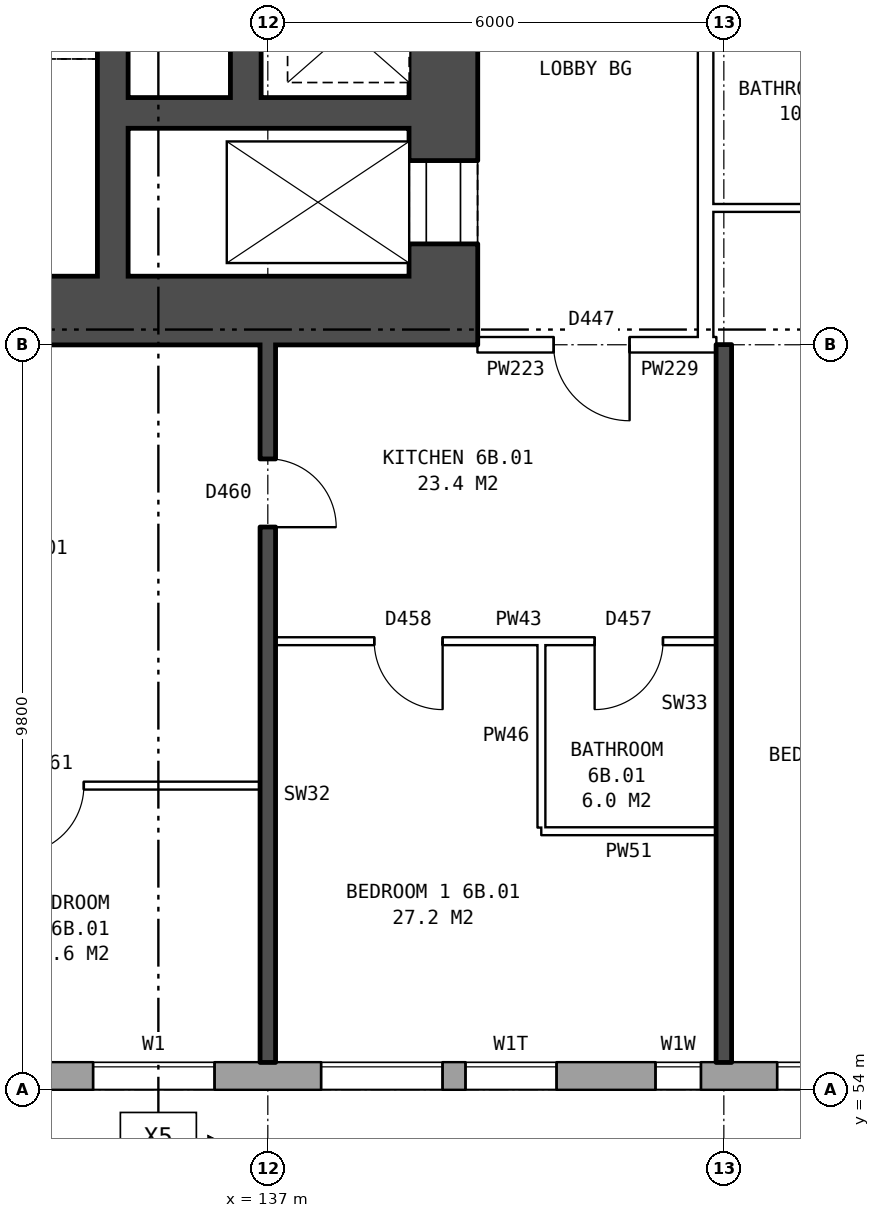
"""IFC4 building model, lengths in metres.
Left out: names, types, materials, properties, quantities, classifications, styles, units other than length and angle.
Written with IfcOpenShell. Run it as: python <this file> out.ifc"""

import sys

from ifc_helpers import new_model, si_unit, direction, frame, frame_2d, origin, place, context, subcontext, project, spatial, rectangle, extrude, element, fill, save


model = new_model("IFC4")
c1 = context("Model", 3, precision=1e-05, world=origin(), true_north=direction((0.0, 1.0)))
c2 = subcontext(c1, "Body", "Model", "MODEL_VIEW")
j1 = project(units=[si_unit("LENGTHUNIT", "METRE"), si_unit("PLANEANGLEUNIT", "RADIAN")], contexts=[c1])
p1 = place(None, origin())
s1 = spatial("IfcSite", under=j1, at=p1, CompositionType="ELEMENT")
p2 = place(p1, origin())
s2 = spatial("IfcBuilding", under=s1, at=p2, CompositionType="ELEMENT")
p3 = place(p2, frame((0.0, 0.0, 25.7)))
s3 = spatial("IfcBuildingStorey", under=s2, at=p3, CompositionType="ELEMENT", Elevation=25.7)
p4 = place(p3, frame((131.18, 57.075, 0.0), z_axis=(0.0, 0.0, 1.0), x_axis=(0.707106781187, -0.707106781187, 0.0)))
e1 = element("IfcWall", 1, at=p4, inside=s3, PredefinedType="STANDARD", context=c2, shape_type="SweptSolid", body=[
    extrude(rectangle(XDim=4.094, YDim=0.36, at=frame_2d((2.047, 0.0))), origin(), (0.0, 0.0, 1.0), 2.85),
])
p5 = place(p4, frame((1.247, 0.0, 0.8)))
e2 = element("IfcOpeningElement", 2, at=p5, cuts=e1, PredefinedType="OPENING", context=c2, shape_type="SweptSolid", body=[
    extrude(rectangle(XDim=1.6, YDim=1.8, at=frame_2d((0.8, 0.9))), frame((0.0, 0.19, 0.0), z_axis=(0.0, -1.0, 0.0), x_axis=(1.0, 0.0, 0.0)), (0.0, 0.0, 1.0), 0.38),
])
p6 = place(p3, frame((134.075, 54.18, 0.0), z_axis=(0.0, 0.0, 1.0), x_axis=(1.0, 0.0, 0.0)))
e3 = element("IfcWall", 3, at=p6, inside=s3, PredefinedType="STANDARD", context=c2, shape_type="SweptSolid", body=[
    extrude(rectangle(XDim=40.601, YDim=0.36, at=frame_2d((20.3, 0.0))), origin(), (0.0, 0.0, 1.0), 2.85),
])
p7 = place(p6, frame((0.625, 0.0, 0.8)))
e4 = element("IfcOpeningElement", 4, at=p7, cuts=e3, PredefinedType="OPENING", context=c2, shape_type="SweptSolid", body=[
    extrude(rectangle(XDim=1.6, YDim=1.8, at=frame_2d((0.8, 0.9))), frame((0.0, 0.19, 0.0), z_axis=(0.0, -1.0, 0.0), x_axis=(1.0, 0.0, 0.0)), (0.0, 0.0, 1.0), 0.38),
])
p8 = place(p6, frame((3.625, 0.0, 0.8)))
e5 = element("IfcOpeningElement", 5, at=p8, cuts=e3, PredefinedType="OPENING", context=c2, shape_type="SweptSolid", body=[
    extrude(rectangle(XDim=1.6, YDim=1.8, at=frame_2d((0.8, 0.9))), frame((0.0, 0.19, 0.0), z_axis=(0.0, -1.0, 0.0), x_axis=(1.0, 0.0, 0.0)), (0.0, 0.0, 1.0), 0.38),
])
p9 = place(p6, frame((5.525, 0.0, 1.7)))
e6 = element("IfcOpeningElement", 6, at=p9, cuts=e3, PredefinedType="OPENING", context=c2, shape_type="SweptSolid", body=[
    extrude(rectangle(XDim=1.2, YDim=0.9, at=frame_2d((0.6, 0.45))), frame((0.0, 0.19, 0.0), z_axis=(0.0, -1.0, 0.0), x_axis=(1.0, 0.0, 0.0)), (0.0, 0.0, 1.0), 0.38),
])
p10 = place(p6, frame((9.625, 0.0, 0.8)))
e7 = element("IfcOpeningElement", 7, at=p10, cuts=e3, PredefinedType="OPENING", context=c2, shape_type="SweptSolid", body=[
    extrude(rectangle(XDim=1.6, YDim=1.8, at=frame_2d((0.8, 0.9))), frame((0.0, 0.19, 0.0), z_axis=(0.0, -1.0, 0.0), x_axis=(1.0, 0.0, 0.0)), (0.0, 0.0, 1.0), 0.38),
])
p11 = place(p6, frame((12.625, 0.0, 0.8)))
e8 = element("IfcOpeningElement", 8, at=p11, cuts=e3, PredefinedType="OPENING", context=c2, shape_type="SweptSolid", body=[
    extrude(rectangle(XDim=1.6, YDim=1.8, at=frame_2d((0.8, 0.9))), frame((0.0, 0.19, 0.0), z_axis=(0.0, -1.0, 0.0), x_axis=(1.0, 0.0, 0.0)), (0.0, 0.0, 1.0), 0.38),
])
p12 = place(p6, frame((15.625, 0.0, 0.8)))
e9 = element("IfcOpeningElement", 9, at=p12, cuts=e3, PredefinedType="OPENING", context=c2, shape_type="SweptSolid", body=[
    extrude(rectangle(XDim=1.6, YDim=1.8, at=frame_2d((0.8, 0.9))), frame((0.0, 0.19, 0.0), z_axis=(0.0, -1.0, 0.0), x_axis=(1.0, 0.0, 0.0)), (0.0, 0.0, 1.0), 0.38),
])
p13 = place(p6, frame((18.625, 0.0, 0.8)))
e10 = element("IfcOpeningElement", 10, at=p13, cuts=e3, PredefinedType="OPENING", context=c2, shape_type="SweptSolid", body=[
    extrude(rectangle(XDim=1.6, YDim=1.8, at=frame_2d((0.8, 0.9))), frame((0.0, 0.19, 0.0), z_axis=(0.0, -1.0, 0.0), x_axis=(1.0, 0.0, 0.0)), (0.0, 0.0, 1.0), 0.38),
])
p14 = place(p6, frame((21.625, 0.0, 0.8)))
e11 = element("IfcOpeningElement", 11, at=p14, cuts=e3, PredefinedType="OPENING", context=c2, shape_type="SweptSolid", body=[
    extrude(rectangle(XDim=1.6, YDim=1.8, at=frame_2d((0.8, 0.9))), frame((0.0, 0.19, 0.0), z_axis=(0.0, -1.0, 0.0), x_axis=(1.0, 0.0, 0.0)), (0.0, 0.0, 1.0), 0.38),
])
p15 = place(p6, frame((24.625, 0.0, 0.8)))
e12 = element("IfcOpeningElement", 12, at=p15, cuts=e3, PredefinedType="OPENING", context=c2, shape_type="SweptSolid", body=[
    extrude(rectangle(XDim=1.6, YDim=1.8, at=frame_2d((0.8, 0.9))), frame((0.0, 0.19, 0.0), z_axis=(0.0, -1.0, 0.0), x_axis=(1.0, 0.0, 0.0)), (0.0, 0.0, 1.0), 0.38),
])
p16 = place(p6, frame((27.625, 0.0, 0.8)))
e13 = element("IfcOpeningElement", 13, at=p16, cuts=e3, PredefinedType="OPENING", context=c2, shape_type="SweptSolid", body=[
    extrude(rectangle(XDim=1.6, YDim=1.8, at=frame_2d((0.8, 0.9))), frame((0.0, 0.19, 0.0), z_axis=(0.0, -1.0, 0.0), x_axis=(1.0, 0.0, 0.0)), (0.0, 0.0, 1.0), 0.38),
])
p17 = place(p6, frame((30.125, 0.0, 0.8)))
e14 = element("IfcOpeningElement", 14, at=p17, cuts=e3, PredefinedType="OPENING", context=c2, shape_type="SweptSolid", body=[
    extrude(rectangle(XDim=1.2, YDim=1.8, at=frame_2d((0.6, 0.9))), frame((0.0, 0.19, 0.0), z_axis=(0.0, -1.0, 0.0), x_axis=(1.0, 0.0, 0.0)), (0.0, 0.0, 1.0), 0.38),
])
p18 = place(p6, frame((33.825, 0.0, 1.7)))
e15 = element("IfcOpeningElement", 15, at=p18, cuts=e3, PredefinedType="OPENING", context=c2, shape_type="SweptSolid", body=[
    extrude(rectangle(XDim=1.0, YDim=0.9, at=frame_2d((0.5, 0.45))), frame((0.0, 0.19, 0.0), z_axis=(0.0, -1.0, 0.0), x_axis=(1.0, 0.0, 0.0)), (0.0, 0.0, 1.0), 0.38),
])
p19 = place(p6, frame((36.625, 0.0, 0.8)))
e16 = element("IfcOpeningElement", 16, at=p19, cuts=e3, PredefinedType="OPENING", context=c2, shape_type="SweptSolid", body=[
    extrude(rectangle(XDim=1.6, YDim=1.8, at=frame_2d((0.8, 0.9))), frame((0.0, 0.19, 0.0), z_axis=(0.0, -1.0, 0.0), x_axis=(1.0, 0.0, 0.0)), (0.0, 0.0, 1.0), 0.38),
])
p20 = place(p6, frame((8.025, 0.0, 0.8)))
e17 = element("IfcOpeningElement", 17, at=p20, cuts=e3, PredefinedType="OPENING", context=c2, shape_type="SweptSolid", body=[
    extrude(rectangle(XDim=0.6, YDim=0.9, at=frame_2d((0.3, 0.45))), frame((0.0, 0.19, 0.0), z_axis=(0.0, -1.0, 0.0), x_axis=(1.0, 0.0, 0.0)), (0.0, 0.0, 1.0), 0.38),
])
p21 = place(p6, frame((31.625, 0.0, 0.8)))
e18 = element("IfcOpeningElement", 18, at=p21, cuts=e3, PredefinedType="OPENING", context=c2, shape_type="SweptSolid", body=[
    extrude(rectangle(XDim=0.6, YDim=1.2, at=frame_2d((0.3, 0.6))), frame((0.0, 0.19, 0.0), z_axis=(0.0, -1.0, 0.0), x_axis=(1.0, 0.0, 0.0)), (0.0, 0.0, 1.0), 0.38),
])
p22 = place(p6, frame((35.125, 0.0, 0.8)))
e19 = element("IfcOpeningElement", 19, at=p22, cuts=e3, PredefinedType="OPENING", context=c2, shape_type="SweptSolid", body=[
    extrude(rectangle(XDim=1.2, YDim=1.8, at=frame_2d((0.6, 0.9))), frame((0.0, 0.19, 0.0), z_axis=(0.0, -1.0, 0.0), x_axis=(1.0, 0.0, 0.0)), (0.0, 0.0, 1.0), 0.38),
])
p23 = place(p3, frame((139.31, 64.7, 0.0), z_axis=(0.0, 0.0, 1.0), x_axis=(0.0, 1.0, 0.0)))
e20 = element("IfcWall", 20, at=p23, inside=s3, PredefinedType="SHEAR", context=c2, shape_type="SweptSolid", body=[
    extrude(rectangle(XDim=10.6, YDim=0.9, at=frame_2d((5.3, 0.0))), origin(), (0.0, 0.0, 1.0), 2.85),
])
p24 = place(p23, frame((0.425, 0.0, 0.0)))
e21 = element("IfcOpeningElement", 21, at=p24, cuts=e20, PredefinedType="OPENING", context=c2, shape_type="SweptSolid", body=[
    extrude(rectangle(XDim=1.1, YDim=2.1, at=frame_2d((0.55, 1.05))), frame((0.0, 0.46, 0.0), z_axis=(0.0, -1.0, 0.0), x_axis=(1.0, 0.0, 0.0)), (0.0, 0.0, 1.0), 0.92),
])
p25 = place(p23, frame((9.0, 0.0, 0.0)))
e22 = element("IfcOpeningElement", 22, at=p25, cuts=e20, PredefinedType="OPENING", context=c2, shape_type="SweptSolid", body=[
    extrude(rectangle(XDim=1.1, YDim=2.1, at=frame_2d((0.55, 1.05))), frame((0.0, 0.46, 0.0), z_axis=(0.0, -1.0, 0.0), x_axis=(1.0, 0.0, 0.0)), (0.0, 0.0, 1.0), 0.92),
])
p26 = place(p23, frame((7.225, 0.0, 0.0)))
e23 = element("IfcOpeningElement", 23, at=p26, cuts=e20, PredefinedType="OPENING", context=c2, shape_type="SweptSolid", body=[
    extrude(rectangle(XDim=0.85, YDim=2.1, at=frame_2d((0.425, 1.05))), frame((0.0, 0.46, 0.0), z_axis=(0.0, -1.0, 0.0), x_axis=(1.0, 0.0, 0.0)), (0.0, 0.0, 1.0), 0.92),
])
p27 = place(p3, frame((139.76, 64.25, 0.0), z_axis=(0.0, 0.0, 1.0), x_axis=(-1.0, 0.0, 0.0)))
e24 = element("IfcWall", 24, at=p27, inside=s3, PredefinedType="SHEAR", context=c2, shape_type="SweptSolid", body=[
    extrude(rectangle(XDim=8.4, YDim=0.9, at=frame_2d((4.2, 0.0))), origin(), (0.0, 0.0, 1.0), 2.85),
])
p28 = place(p3, frame((138.86, 66.85, 0.0), z_axis=(0.0, 0.0, 1.0), x_axis=(-1.0, 0.0, 0.0)))
e25 = element("IfcWall", 25, at=p28, inside=s3, PredefinedType="SHEAR", context=c2, shape_type="SweptSolid", body=[
    extrude(rectangle(XDim=3.7, YDim=0.4, at=frame_2d((1.85, 0.0))), origin(), (0.0, 0.0, 1.0), 2.85),
])
p29 = place(p3, frame((136.71, 67.05, 0.0), z_axis=(0.0, 0.0, 1.0), x_axis=(0.0, 1.0, 0.0)))
e26 = element("IfcWall", 26, at=p29, inside=s3, PredefinedType="SHEAR", context=c2, shape_type="SweptSolid", body=[
    extrude(rectangle(XDim=4.0, YDim=0.4, at=frame_2d((2.0, 0.0))), origin(), (0.0, 0.0, 1.0), 2.85),
])
p30 = place(p3, frame((134.96, 64.7, 0.0), z_axis=(0.0, 0.0, 1.0), x_axis=(0.0, 1.0, 0.0)))
e27 = element("IfcWall", 27, at=p30, inside=s3, PredefinedType="SHEAR", context=c2, shape_type="SweptSolid", body=[
    extrude(rectangle(XDim=6.35, YDim=0.4, at=frame_2d((3.175, 0.0))), origin(), (0.0, 0.0, 1.0), 2.85),
])
p31 = place(p3, frame((142.76, 63.9, 0.0), z_axis=(0.0, 0.0, 1.0), x_axis=(0.0, 1.0, 0.0)))
e28 = element("IfcWall", 28, at=p31, inside=s3, PredefinedType="PARTITIONING", context=c2, shape_type="SweptSolid", body=[
    extrude(rectangle(XDim=12.2, YDim=0.2, at=frame_2d((6.1, 0.0))), origin(), (0.0, 0.0, 1.0), 2.85),
])
p32 = place(p31, frame((5.1, 0.0, 0.0)))
e29 = element("IfcOpeningElement", 29, at=p32, cuts=e28, PredefinedType="OPENING", context=c2, shape_type="SweptSolid", body=[
    extrude(rectangle(XDim=2.0, YDim=2.1, at=frame_2d((1.0, 1.05))), frame((0.0, 0.11, 0.0), z_axis=(0.0, -1.0, 0.0), x_axis=(1.0, 0.0, 0.0)), (0.0, 0.0, 1.0), 0.22),
])
p33 = place(p3, frame((140.6, 57.4, 0.0), z_axis=(0.0, 0.0, 1.0), x_axis=(1.0, 0.0, 0.0)))
e30 = element("IfcWall", 30, at=p33, inside=s3, PredefinedType="PARTITIONING", context=c2, shape_type="SweptSolid", body=[
    extrude(rectangle(XDim=2.3, YDim=0.1, at=frame_2d((1.15, 0.0))), origin(), (0.0, 0.0, 1.0), 2.85),
])
p34 = place(p3, frame((131.36, 58.0, 0.0), z_axis=(0.0, 0.0, 1.0), x_axis=(1.0, 0.0, 0.0)))
e31 = element("IfcWall", 31, at=p34, inside=s3, PredefinedType="PARTITIONING", context=c2, shape_type="SweptSolid", body=[
    extrude(rectangle(XDim=5.54, YDim=0.1, at=frame_2d((2.77, 0.0))), origin(), (0.0, 0.0, 1.0), 2.85),
])
p35 = place(p34, frame((2.32, 0.0, 0.0)))
e32 = element("IfcOpeningElement", 32, at=p35, cuts=e31, PredefinedType="OPENING", context=c2, shape_type="SweptSolid", body=[
    extrude(rectangle(XDim=0.9, YDim=2.1, at=frame_2d((0.45, 1.05))), frame((0.0, 0.06, 0.0), z_axis=(0.0, -1.0, 0.0), x_axis=(1.0, 0.0, 0.0)), (0.0, 0.0, 1.0), 0.12),
])
p36 = place(p3, frame((137.1, 59.9, 0.0), z_axis=(0.0, 0.0, 1.0), x_axis=(1.0, 0.0, 0.0)))
e33 = element("IfcWall", 33, at=p36, inside=s3, PredefinedType="PARTITIONING", context=c2, shape_type="SweptSolid", body=[
    extrude(rectangle(XDim=5.8, YDim=0.1, at=frame_2d((2.9, 0.0))), origin(), (0.0, 0.0, 1.0), 2.85),
])
p37 = place(p36, frame((1.3, 0.0, 0.0)))
e34 = element("IfcOpeningElement", 34, at=p37, cuts=e33, PredefinedType="OPENING", context=c2, shape_type="SweptSolid", body=[
    extrude(rectangle(XDim=0.9, YDim=2.1, at=frame_2d((0.45, 1.05))), frame((0.0, 0.06, 0.0), z_axis=(0.0, -1.0, 0.0), x_axis=(1.0, 0.0, 0.0)), (0.0, 0.0, 1.0), 0.12),
])
p38 = place(p36, frame((4.2, 0.0, 0.0)))
e35 = element("IfcOpeningElement", 35, at=p38, cuts=e33, PredefinedType="OPENING", context=c2, shape_type="SweptSolid", body=[
    extrude(rectangle(XDim=0.9, YDim=2.1, at=frame_2d((0.45, 1.05))), frame((0.0, 0.06, 0.0), z_axis=(0.0, -1.0, 0.0), x_axis=(1.0, 0.0, 0.0)), (0.0, 0.0, 1.0), 0.12),
])
p39 = place(p3, frame((139.76, 63.8, 0.0), z_axis=(0.0, 0.0, 1.0), x_axis=(1.0, 0.0, 0.0)))
e36 = element("IfcWall", 36, at=p39, inside=s3, PredefinedType="PARTITIONING", context=c2, shape_type="SweptSolid", body=[
    extrude(rectangle(XDim=3.0, YDim=0.2, at=frame_2d((1.5, 0.0))), origin(), (0.0, 0.0, 1.0), 2.85),
])
p40 = place(p39, frame((1.0, 0.0, 0.0)))
e37 = element("IfcOpeningElement", 37, at=p40, cuts=e36, PredefinedType="OPENING", context=c2, shape_type="SweptSolid", body=[
    extrude(rectangle(XDim=1.0, YDim=2.1, at=frame_2d((0.5, 1.05))), frame((0.0, 0.11, 0.0), z_axis=(0.0, -1.0, 0.0), x_axis=(1.0, 0.0, 0.0)), (0.0, 0.0, 1.0), 0.22),
])
p41 = place(p3, frame((142.76, 63.8, 0.0), z_axis=(0.0, 0.0, 1.0), x_axis=(1.0, 0.0, 0.0)))
e38 = element("IfcWall", 38, at=p41, inside=s3, PredefinedType="PARTITIONING", context=c2, shape_type="SweptSolid", body=[
    extrude(rectangle(XDim=0.14, YDim=0.2, at=frame_2d((0.07, 0.0))), origin(), (0.0, 0.0, 1.0), 2.85),
])
p42 = place(p3, frame((142.76, 65.6, 0.0), z_axis=(0.0, 0.0, 1.0), x_axis=(1.0, 0.0, 0.0)))
e39 = element("IfcWall", 39, at=p42, inside=s3, PredefinedType="PARTITIONING", context=c2, shape_type="SweptSolid", body=[
    extrude(rectangle(XDim=3.24, YDim=0.1, at=frame_2d((1.62, 0.0))), origin(), (0.0, 0.0, 1.0), 2.85),
])
p43 = place(p3, frame((137.0, 54.36, 0.0), z_axis=(0.0, 0.0, 1.0), x_axis=(0.0, 1.0, 0.0)))
e40 = element("IfcWall", 40, at=p43, inside=s3, PredefinedType="SOLIDWALL", context=c2, shape_type="SweptSolid", body=[
    extrude(rectangle(XDim=9.44, YDim=0.2, at=frame_2d((4.72, 0.0))), origin(), (0.0, 0.0, 1.0), 2.85),
])
p44 = place(p43, frame((7.04, 0.0, 0.0)))
e41 = element("IfcOpeningElement", 41, at=p44, cuts=e40, PredefinedType="OPENING", context=c2, shape_type="SweptSolid", body=[
    extrude(rectangle(XDim=0.9, YDim=2.1, at=frame_2d((0.45, 1.05))), frame((0.0, 0.11, 0.0), z_axis=(0.0, -1.0, 0.0), x_axis=(1.0, 0.0, 0.0)), (0.0, 0.0, 1.0), 0.22),
])
p45 = place(p3, frame((140.6, 57.45, 0.0), z_axis=(0.0, 0.0, 1.0), x_axis=(0.0, 1.0, 0.0)))
e42 = element("IfcWall", 42, at=p45, inside=s3, PredefinedType="PARTITIONING", context=c2, shape_type="SweptSolid", body=[
    extrude(rectangle(XDim=2.4, YDim=0.1, at=frame_2d((1.2, 0.0))), origin(), (0.0, 0.0, 1.0), 2.85),
])
p46 = place(p3, frame((143.0, 54.36, 0.0), z_axis=(0.0, 0.0, 1.0), x_axis=(0.0, 1.0, 0.0)))
e43 = element("IfcWall", 43, at=p46, inside=s3, PredefinedType="SOLIDWALL", context=c2, shape_type="SweptSolid", body=[
    extrude(rectangle(XDim=9.44, YDim=0.2, at=frame_2d((4.72, 0.0))), origin(), (0.0, 0.0, 1.0), 2.85),
])
p47 = place(p7, origin())
e44 = element("IfcWindow", 44, at=p47, inside=s3, PartitioningType="SINGLE_PANEL", PredefinedType="WINDOW", context=c2, shape_type="SweptSolid", body=[
    extrude(rectangle(XDim=1.6, YDim=1.8, at=frame_2d((0.8, 0.9))), frame((0.0, 0.15, 0.0), z_axis=(0.0, -1.0, 0.0), x_axis=(1.0, 0.0, 0.0)), (0.0, 0.0, 1.0), 0.06),
])
fill(e4, e44)
p48 = place(p8, origin())
e45 = element("IfcWindow", 45, at=p48, inside=s3, PartitioningType="SINGLE_PANEL", PredefinedType="WINDOW", context=c2, shape_type="SweptSolid", body=[
    extrude(rectangle(XDim=1.6, YDim=1.8, at=frame_2d((0.8, 0.9))), frame((0.0, 0.15, 0.0), z_axis=(0.0, -1.0, 0.0), x_axis=(1.0, 0.0, 0.0)), (0.0, 0.0, 1.0), 0.06),
])
fill(e5, e45)
p49 = place(p9, origin())
e46 = element("IfcWindow", 46, at=p49, inside=s3, PartitioningType="SINGLE_PANEL", PredefinedType="WINDOW", context=c2, shape_type="SweptSolid", body=[
    extrude(rectangle(XDim=1.2, YDim=0.9, at=frame_2d((0.6, 0.45))), frame((0.0, 0.15, 0.0), z_axis=(0.0, -1.0, 0.0), x_axis=(1.0, 0.0, 0.0)), (0.0, 0.0, 1.0), 0.06),
])
fill(e6, e46)
p50 = place(p10, origin())
e47 = element("IfcWindow", 47, at=p50, inside=s3, PartitioningType="SINGLE_PANEL", PredefinedType="WINDOW", context=c2, shape_type="SweptSolid", body=[
    extrude(rectangle(XDim=1.6, YDim=1.8, at=frame_2d((0.8, 0.9))), frame((0.0, 0.15, 0.0), z_axis=(0.0, -1.0, 0.0), x_axis=(1.0, 0.0, 0.0)), (0.0, 0.0, 1.0), 0.06),
])
fill(e7, e47)
p51 = place(p24, origin())
e48 = element("IfcDoor", 48, at=p51, inside=s3, OperationType="DOUBLE_DOOR_SLIDING", PredefinedType="DOOR", context=c2, shape_type="SweptSolid", body=[
    extrude(rectangle(XDim=1.1, YDim=2.1, at=frame_2d((0.55, 1.05))), frame((0.0, 0.435, 0.0), z_axis=(0.0, -1.0, 0.0), x_axis=(1.0, 0.0, 0.0)), (0.0, 0.0, 1.0), 0.05),
])
fill(e21, e48)
p52 = place(p37, frame((0.9, 0.0, 0.0), z_axis=(0.0, 0.0, 1.0), x_axis=(-1.0, 0.0, 0.0)))
e49 = element("IfcDoor", 49, at=p52, inside=s3, OperationType="SINGLE_SWING_LEFT", PredefinedType="DOOR", context=c2, shape_type="SweptSolid", body=[
    extrude(rectangle(XDim=0.9, YDim=2.1, at=frame_2d((0.45, 1.05))), frame((0.0, 0.025, 0.0), z_axis=(0.0, -1.0, 0.0), x_axis=(1.0, 0.0, 0.0)), (0.0, 0.0, 1.0), 0.05),
])
fill(e34, e49)
p53 = place(p35, frame((0.9, 0.0, 0.0), z_axis=(0.0, 0.0, 1.0), x_axis=(-1.0, 0.0, 0.0)))
e50 = element("IfcDoor", 50, at=p53, inside=s3, OperationType="SINGLE_SWING_RIGHT", PredefinedType="DOOR", context=c2, shape_type="SweptSolid", body=[
    extrude(rectangle(XDim=0.9, YDim=2.1, at=frame_2d((0.45, 1.05))), frame((0.0, 0.025, 0.0), z_axis=(0.0, -1.0, 0.0), x_axis=(1.0, 0.0, 0.0)), (0.0, 0.0, 1.0), 0.05),
])
fill(e32, e50)
p54 = place(p40, frame((1.0, 0.0, 0.0), z_axis=(0.0, 0.0, 1.0), x_axis=(-1.0, 0.0, 0.0)))
e51 = element("IfcDoor", 51, at=p54, inside=s3, OperationType="SINGLE_SWING_LEFT", PredefinedType="DOOR", context=c2, shape_type="SweptSolid", body=[
    extrude(rectangle(XDim=1.0, YDim=2.1, at=frame_2d((0.5, 1.05))), frame((0.0, 0.025, 0.0), z_axis=(0.0, -1.0, 0.0), x_axis=(1.0, 0.0, 0.0)), (0.0, 0.0, 1.0), 0.05),
])
fill(e37, e51)
p55 = place(p44, frame((0.9, 0.0, 0.0), z_axis=(0.0, 0.0, 1.0), x_axis=(-1.0, 0.0, 0.0)))
e52 = element("IfcDoor", 52, at=p55, inside=s3, OperationType="SINGLE_SWING_RIGHT", PredefinedType="DOOR", context=c2, shape_type="SweptSolid", body=[
    extrude(rectangle(XDim=0.9, YDim=2.1, at=frame_2d((0.45, 1.05))), frame((0.0, 0.025, 0.0), z_axis=(0.0, -1.0, 0.0), x_axis=(1.0, 0.0, 0.0)), (0.0, 0.0, 1.0), 0.05),
])
fill(e41, e52)
p56 = place(p38, frame((0.9, 0.0, 0.0), z_axis=(0.0, 0.0, 1.0), x_axis=(-1.0, 0.0, 0.0)))
e53 = element("IfcDoor", 53, at=p56, inside=s3, OperationType="SINGLE_SWING_RIGHT", PredefinedType="DOOR", context=c2, shape_type="SweptSolid", body=[
    extrude(rectangle(XDim=0.9, YDim=2.1, at=frame_2d((0.45, 1.05))), frame((0.0, 0.025, 0.0), z_axis=(0.0, -1.0, 0.0), x_axis=(1.0, 0.0, 0.0)), (0.0, 0.0, 1.0), 0.05),
])
fill(e35, e53)
p57 = place(p20, origin())
e54 = element("IfcWindow", 54, at=p57, inside=s3, PartitioningType="SINGLE_PANEL", PredefinedType="WINDOW", context=c2, shape_type="SweptSolid", body=[
    extrude(rectangle(XDim=0.6, YDim=0.9, at=frame_2d((0.3, 0.45))), frame((0.0, 0.15, 0.0), z_axis=(0.0, -1.0, 0.0), x_axis=(1.0, 0.0, 0.0)), (0.0, 0.0, 1.0), 0.06),
])
fill(e17, e54)
save(model, sys.argv[1])
